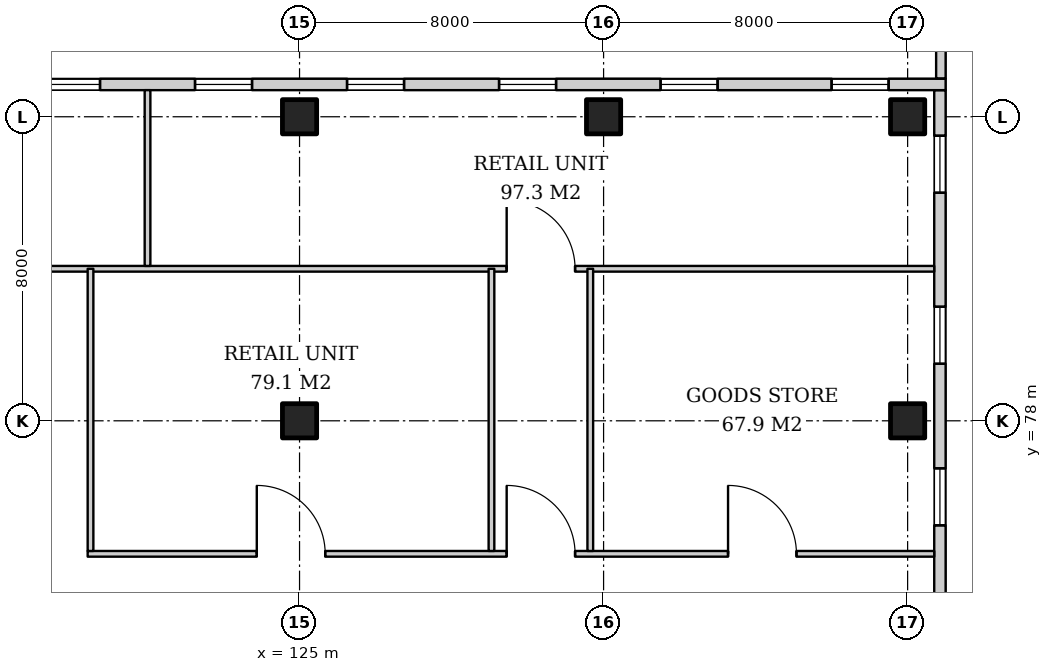
"""IFC4 building model, lengths in metres.
Left out: names, types, materials, properties, quantities, classifications, styles, units other than length and angle.
Written with IfcOpenShell. Run it as: python <this file> out.ifc"""

import sys

from ifc_helpers import new_model, si_unit, direction, frame, frame_2d, origin, origin_2d, place, context, subcontext, project, spatial, rectangle, extrude, element, fill, save


model = new_model("IFC4")
c1 = context("Model", 3, precision=1e-05, world=origin(), true_north=direction((0.0, 1.0)))
c2 = subcontext(c1, "Body", "Model", "MODEL_VIEW")
j1 = project(units=[si_unit("LENGTHUNIT", "METRE"), si_unit("PLANEANGLEUNIT", "RADIAN")], contexts=[c1])
p1 = place(None, origin())
s1 = spatial("IfcSite", under=j1, at=p1, CompositionType="ELEMENT")
p2 = place(p1, origin())
s2 = spatial("IfcBuilding", under=s1, at=p2, CompositionType="ELEMENT")
p3 = place(p2, frame((0.0, 0.0, 6.0)))
s3 = spatial("IfcBuildingStorey", under=s2, at=p3, CompositionType="ELEMENT", Elevation=6.0)
for number, where, z_axis, x_axis in (
    (1, (125.0, 78.0, 0.0), (0.0, 0.0, 1.0), (1.0, 0.0, 0.0)),
    (2, (125.0, 86.0, 0.0), (0.0, 0.0, 1.0), (1.0, 0.0, 0.0)),
    (3, (133.0, 86.0, 0.0), (0.0, 0.0, 1.0), (1.0, 0.0, 0.0)),
    (4, (141.0, 78.0, 0.0), (0.0, 0.0, 1.0), (1.0, 0.0, 0.0)),
    (5, (141.0, 86.0, 0.0), (0.0, 0.0, 1.0), (1.0, 0.0, 0.0)),
):
    element("IfcColumn", number, at=place(p3, frame(where, z_axis=z_axis, x_axis=x_axis)), inside=s3, PredefinedType="COLUMN", context=c2, shape_type="SweptSolid", body=[
        extrude(rectangle(XDim=0.9, YDim=0.9, at=origin_2d()), origin(), (0.0, 0.0, 1.0), 5.0),
    ])
p4 = place(p3, frame((141.85, 13.3, 0.0), z_axis=(0.0, 0.0, 1.0), x_axis=(0.0, 1.0, 0.0)))
e6 = element("IfcWall", 6, at=p4, inside=s3, PredefinedType="SOLIDWALL", context=c2, shape_type="SweptSolid", body=[
    extrude(rectangle(XDim=73.4, YDim=0.3, at=frame_2d((36.7, 0.0))), origin(), (0.0, 0.0, 1.0), 4.7),
])
p5 = place(p4, frame((1.2, 0.0, 0.9)))
e7 = element("IfcOpeningElement", 7, at=p5, cuts=e6, PredefinedType="OPENING", context=c2, shape_type="SweptSolid", body=[
    extrude(rectangle(XDim=1.5, YDim=3.2, at=frame_2d((0.75, 1.6))), frame((0.0, 0.16, 0.0), z_axis=(0.0, -1.0, 0.0), x_axis=(1.0, 0.0, 0.0)), (0.0, 0.0, 1.0), 0.32),
])
p6 = place(p4, frame((5.7, 0.0, 0.9)))
e8 = element("IfcOpeningElement", 8, at=p6, cuts=e6, PredefinedType="OPENING", context=c2, shape_type="SweptSolid", body=[
    extrude(rectangle(XDim=1.5, YDim=3.2, at=frame_2d((0.75, 1.6))), frame((0.0, 0.16, 0.0), z_axis=(0.0, -1.0, 0.0), x_axis=(1.0, 0.0, 0.0)), (0.0, 0.0, 1.0), 0.32),
])
p7 = place(p4, frame((9.95, 0.0, 0.9)))
e9 = element("IfcOpeningElement", 9, at=p7, cuts=e6, PredefinedType="OPENING", context=c2, shape_type="SweptSolid", body=[
    extrude(rectangle(XDim=1.5, YDim=3.2, at=frame_2d((0.75, 1.6))), frame((0.0, 0.16, 0.0), z_axis=(0.0, -1.0, 0.0), x_axis=(1.0, 0.0, 0.0)), (0.0, 0.0, 1.0), 0.32),
])
p8 = place(p4, frame((13.95, 0.0, 0.9)))
e10 = element("IfcOpeningElement", 10, at=p8, cuts=e6, PredefinedType="OPENING", context=c2, shape_type="SweptSolid", body=[
    extrude(rectangle(XDim=1.5, YDim=3.2, at=frame_2d((0.75, 1.6))), frame((0.0, 0.16, 0.0), z_axis=(0.0, -1.0, 0.0), x_axis=(1.0, 0.0, 0.0)), (0.0, 0.0, 1.0), 0.32),
])
p9 = place(p4, frame((17.95, 0.0, 0.9)))
e11 = element("IfcOpeningElement", 11, at=p9, cuts=e6, PredefinedType="OPENING", context=c2, shape_type="SweptSolid", body=[
    extrude(rectangle(XDim=1.5, YDim=3.2, at=frame_2d((0.75, 1.6))), frame((0.0, 0.16, 0.0), z_axis=(0.0, -1.0, 0.0), x_axis=(1.0, 0.0, 0.0)), (0.0, 0.0, 1.0), 0.32),
])
p10 = place(p4, frame((21.95, 0.0, 0.9)))
e12 = element("IfcOpeningElement", 12, at=p10, cuts=e6, PredefinedType="OPENING", context=c2, shape_type="SweptSolid", body=[
    extrude(rectangle(XDim=1.5, YDim=3.2, at=frame_2d((0.75, 1.6))), frame((0.0, 0.16, 0.0), z_axis=(0.0, -1.0, 0.0), x_axis=(1.0, 0.0, 0.0)), (0.0, 0.0, 1.0), 0.32),
])
p11 = place(p4, frame((25.95, 0.0, 0.9)))
e13 = element("IfcOpeningElement", 13, at=p11, cuts=e6, PredefinedType="OPENING", context=c2, shape_type="SweptSolid", body=[
    extrude(rectangle(XDim=1.5, YDim=3.2, at=frame_2d((0.75, 1.6))), frame((0.0, 0.16, 0.0), z_axis=(0.0, -1.0, 0.0), x_axis=(1.0, 0.0, 0.0)), (0.0, 0.0, 1.0), 0.32),
])
p12 = place(p4, frame((29.95, 0.0, 0.9)))
e14 = element("IfcOpeningElement", 14, at=p12, cuts=e6, PredefinedType="OPENING", context=c2, shape_type="SweptSolid", body=[
    extrude(rectangle(XDim=1.5, YDim=3.2, at=frame_2d((0.75, 1.6))), frame((0.0, 0.16, 0.0), z_axis=(0.0, -1.0, 0.0), x_axis=(1.0, 0.0, 0.0)), (0.0, 0.0, 1.0), 0.32),
])
p13 = place(p4, frame((33.95, 0.0, 0.9)))
e15 = element("IfcOpeningElement", 15, at=p13, cuts=e6, PredefinedType="OPENING", context=c2, shape_type="SweptSolid", body=[
    extrude(rectangle(XDim=1.5, YDim=3.2, at=frame_2d((0.75, 1.6))), frame((0.0, 0.16, 0.0), z_axis=(0.0, -1.0, 0.0), x_axis=(1.0, 0.0, 0.0)), (0.0, 0.0, 1.0), 0.32),
])
p14 = place(p4, frame((37.95, 0.0, 0.9)))
e16 = element("IfcOpeningElement", 16, at=p14, cuts=e6, PredefinedType="OPENING", context=c2, shape_type="SweptSolid", body=[
    extrude(rectangle(XDim=1.5, YDim=3.2, at=frame_2d((0.75, 1.6))), frame((0.0, 0.16, 0.0), z_axis=(0.0, -1.0, 0.0), x_axis=(1.0, 0.0, 0.0)), (0.0, 0.0, 1.0), 0.32),
])
p15 = place(p4, frame((41.95, 0.0, 0.9)))
e17 = element("IfcOpeningElement", 17, at=p15, cuts=e6, PredefinedType="OPENING", context=c2, shape_type="SweptSolid", body=[
    extrude(rectangle(XDim=1.5, YDim=3.2, at=frame_2d((0.75, 1.6))), frame((0.0, 0.16, 0.0), z_axis=(0.0, -1.0, 0.0), x_axis=(1.0, 0.0, 0.0)), (0.0, 0.0, 1.0), 0.32),
])
p16 = place(p4, frame((45.95, 0.0, 0.9)))
e18 = element("IfcOpeningElement", 18, at=p16, cuts=e6, PredefinedType="OPENING", context=c2, shape_type="SweptSolid", body=[
    extrude(rectangle(XDim=1.5, YDim=3.2, at=frame_2d((0.75, 1.6))), frame((0.0, 0.16, 0.0), z_axis=(0.0, -1.0, 0.0), x_axis=(1.0, 0.0, 0.0)), (0.0, 0.0, 1.0), 0.32),
])
p17 = place(p4, frame((49.95, 0.0, 0.9)))
e19 = element("IfcOpeningElement", 19, at=p17, cuts=e6, PredefinedType="OPENING", context=c2, shape_type="SweptSolid", body=[
    extrude(rectangle(XDim=1.5, YDim=3.2, at=frame_2d((0.75, 1.6))), frame((0.0, 0.16, 0.0), z_axis=(0.0, -1.0, 0.0), x_axis=(1.0, 0.0, 0.0)), (0.0, 0.0, 1.0), 0.32),
])
p18 = place(p4, frame((53.95, 0.0, 0.9)))
e20 = element("IfcOpeningElement", 20, at=p18, cuts=e6, PredefinedType="OPENING", context=c2, shape_type="SweptSolid", body=[
    extrude(rectangle(XDim=1.5, YDim=3.2, at=frame_2d((0.75, 1.6))), frame((0.0, 0.16, 0.0), z_axis=(0.0, -1.0, 0.0), x_axis=(1.0, 0.0, 0.0)), (0.0, 0.0, 1.0), 0.32),
])
p19 = place(p4, frame((57.95, 0.0, 0.9)))
e21 = element("IfcOpeningElement", 21, at=p19, cuts=e6, PredefinedType="OPENING", context=c2, shape_type="SweptSolid", body=[
    extrude(rectangle(XDim=1.5, YDim=3.2, at=frame_2d((0.75, 1.6))), frame((0.0, 0.16, 0.0), z_axis=(0.0, -1.0, 0.0), x_axis=(1.0, 0.0, 0.0)), (0.0, 0.0, 1.0), 0.32),
])
p20 = place(p4, frame((61.95, 0.0, 0.9)))
e22 = element("IfcOpeningElement", 22, at=p20, cuts=e6, PredefinedType="OPENING", context=c2, shape_type="SweptSolid", body=[
    extrude(rectangle(XDim=1.5, YDim=3.2, at=frame_2d((0.75, 1.6))), frame((0.0, 0.16, 0.0), z_axis=(0.0, -1.0, 0.0), x_axis=(1.0, 0.0, 0.0)), (0.0, 0.0, 1.0), 0.32),
])
p21 = place(p4, frame((66.2, 0.0, 0.9)))
e23 = element("IfcOpeningElement", 23, at=p21, cuts=e6, PredefinedType="OPENING", context=c2, shape_type="SweptSolid", body=[
    extrude(rectangle(XDim=1.5, YDim=3.2, at=frame_2d((0.75, 1.6))), frame((0.0, 0.16, 0.0), z_axis=(0.0, -1.0, 0.0), x_axis=(1.0, 0.0, 0.0)), (0.0, 0.0, 1.0), 0.32),
])
p22 = place(p4, frame((70.7, 0.0, 0.9)))
e24 = element("IfcOpeningElement", 24, at=p22, cuts=e6, PredefinedType="OPENING", context=c2, shape_type="SweptSolid", body=[
    extrude(rectangle(XDim=1.5, YDim=3.2, at=frame_2d((0.75, 1.6))), frame((0.0, 0.16, 0.0), z_axis=(0.0, -1.0, 0.0), x_axis=(1.0, 0.0, 0.0)), (0.0, 0.0, 1.0), 0.32),
])
p23 = place(p3, frame((142.0, 86.85, 0.0), z_axis=(0.0, 0.0, 1.0), x_axis=(-1.0, 0.0, 0.0)))
e25 = element("IfcWall", 25, at=p23, inside=s3, PredefinedType="SOLIDWALL", context=c2, shape_type="SweptSolid", body=[
    extrude(rectangle(XDim=50.0, YDim=0.3, at=frame_2d((25.0, 0.0))), origin(), (0.0, 0.0, 1.0), 4.7),
])
p24 = place(p23, frame((1.5, 0.0, 0.9)))
e26 = element("IfcOpeningElement", 26, at=p24, cuts=e25, PredefinedType="OPENING", context=c2, shape_type="SweptSolid", body=[
    extrude(rectangle(XDim=1.5, YDim=3.2, at=frame_2d((0.75, 1.6))), frame((0.0, 0.16, 0.0), z_axis=(0.0, -1.0, 0.0), x_axis=(1.0, 0.0, 0.0)), (0.0, 0.0, 1.0), 0.32),
])
p25 = place(p23, frame((6.0, 0.0, 0.9)))
e27 = element("IfcOpeningElement", 27, at=p25, cuts=e25, PredefinedType="OPENING", context=c2, shape_type="SweptSolid", body=[
    extrude(rectangle(XDim=1.5, YDim=3.2, at=frame_2d((0.75, 1.6))), frame((0.0, 0.16, 0.0), z_axis=(0.0, -1.0, 0.0), x_axis=(1.0, 0.0, 0.0)), (0.0, 0.0, 1.0), 0.32),
])
p26 = place(p23, frame((10.25, 0.0, 0.9)))
e28 = element("IfcOpeningElement", 28, at=p26, cuts=e25, PredefinedType="OPENING", context=c2, shape_type="SweptSolid", body=[
    extrude(rectangle(XDim=1.5, YDim=3.2, at=frame_2d((0.75, 1.6))), frame((0.0, 0.16, 0.0), z_axis=(0.0, -1.0, 0.0), x_axis=(1.0, 0.0, 0.0)), (0.0, 0.0, 1.0), 0.32),
])
p27 = place(p23, frame((14.25, 0.0, 0.9)))
e29 = element("IfcOpeningElement", 29, at=p27, cuts=e25, PredefinedType="OPENING", context=c2, shape_type="SweptSolid", body=[
    extrude(rectangle(XDim=1.5, YDim=3.2, at=frame_2d((0.75, 1.6))), frame((0.0, 0.16, 0.0), z_axis=(0.0, -1.0, 0.0), x_axis=(1.0, 0.0, 0.0)), (0.0, 0.0, 1.0), 0.32),
])
p28 = place(p23, frame((18.25, 0.0, 0.9)))
e30 = element("IfcOpeningElement", 30, at=p28, cuts=e25, PredefinedType="OPENING", context=c2, shape_type="SweptSolid", body=[
    extrude(rectangle(XDim=1.5, YDim=3.2, at=frame_2d((0.75, 1.6))), frame((0.0, 0.16, 0.0), z_axis=(0.0, -1.0, 0.0), x_axis=(1.0, 0.0, 0.0)), (0.0, 0.0, 1.0), 0.32),
])
p29 = place(p23, frame((22.25, 0.0, 0.9)))
e31 = element("IfcOpeningElement", 31, at=p29, cuts=e25, PredefinedType="OPENING", context=c2, shape_type="SweptSolid", body=[
    extrude(rectangle(XDim=1.5, YDim=3.2, at=frame_2d((0.75, 1.6))), frame((0.0, 0.16, 0.0), z_axis=(0.0, -1.0, 0.0), x_axis=(1.0, 0.0, 0.0)), (0.0, 0.0, 1.0), 0.32),
])
p30 = place(p23, frame((26.1, 0.0, 0.0)))
e32 = element("IfcOpeningElement", 32, at=p30, cuts=e25, PredefinedType="OPENING", context=c2, shape_type="SweptSolid", body=[
    extrude(rectangle(XDim=1.8, YDim=2.4, at=frame_2d((0.9, 1.2))), frame((0.0, 0.16, 0.0), z_axis=(0.0, -1.0, 0.0), x_axis=(1.0, 0.0, 0.0)), (0.0, 0.0, 1.0), 0.32),
])
p31 = place(p23, frame((30.25, 0.0, 0.9)))
e33 = element("IfcOpeningElement", 33, at=p31, cuts=e25, PredefinedType="OPENING", context=c2, shape_type="SweptSolid", body=[
    extrude(rectangle(XDim=1.5, YDim=3.2, at=frame_2d((0.75, 1.6))), frame((0.0, 0.16, 0.0), z_axis=(0.0, -1.0, 0.0), x_axis=(1.0, 0.0, 0.0)), (0.0, 0.0, 1.0), 0.32),
])
p32 = place(p23, frame((34.25, 0.0, 0.9)))
e34 = element("IfcOpeningElement", 34, at=p32, cuts=e25, PredefinedType="OPENING", context=c2, shape_type="SweptSolid", body=[
    extrude(rectangle(XDim=1.5, YDim=3.2, at=frame_2d((0.75, 1.6))), frame((0.0, 0.16, 0.0), z_axis=(0.0, -1.0, 0.0), x_axis=(1.0, 0.0, 0.0)), (0.0, 0.0, 1.0), 0.32),
])
p33 = place(p23, frame((38.25, 0.0, 0.9)))
e35 = element("IfcOpeningElement", 35, at=p33, cuts=e25, PredefinedType="OPENING", context=c2, shape_type="SweptSolid", body=[
    extrude(rectangle(XDim=1.5, YDim=3.2, at=frame_2d((0.75, 1.6))), frame((0.0, 0.16, 0.0), z_axis=(0.0, -1.0, 0.0), x_axis=(1.0, 0.0, 0.0)), (0.0, 0.0, 1.0), 0.32),
])
p34 = place(p23, frame((42.5, 0.0, 0.9)))
e36 = element("IfcOpeningElement", 36, at=p34, cuts=e25, PredefinedType="OPENING", context=c2, shape_type="SweptSolid", body=[
    extrude(rectangle(XDim=1.5, YDim=3.2, at=frame_2d((0.75, 1.6))), frame((0.0, 0.16, 0.0), z_axis=(0.0, -1.0, 0.0), x_axis=(1.0, 0.0, 0.0)), (0.0, 0.0, 1.0), 0.32),
])
p35 = place(p23, frame((47.0, 0.0, 0.9)))
e37 = element("IfcOpeningElement", 37, at=p35, cuts=e25, PredefinedType="OPENING", context=c2, shape_type="SweptSolid", body=[
    extrude(rectangle(XDim=1.5, YDim=3.2, at=frame_2d((0.75, 1.6))), frame((0.0, 0.16, 0.0), z_axis=(0.0, -1.0, 0.0), x_axis=(1.0, 0.0, 0.0)), (0.0, 0.0, 1.0), 0.32),
])
p36 = place(p3, frame((141.875, 87.01, 0.0), z_axis=(0.0, 0.0, 1.0), x_axis=(0.0, 1.0, 0.0)))
e38 = element("IfcWall", 38, at=p36, inside=s3, PredefinedType="PARAPET", context=c2, shape_type="SweptSolid", body=[
    extrude(rectangle(XDim=7.74, YDim=0.25, at=frame_2d((3.87, 0.0))), origin(), (0.0, 0.0, 1.0), 1.1),
])
p37 = place(p3, frame((92.3, 82.0, 0.0), z_axis=(0.0, 0.0, 1.0), x_axis=(1.0, 0.0, 0.0)))
e39 = element("IfcWall", 39, at=p37, inside=s3, PredefinedType="PARTITIONING", context=c2, shape_type="SweptSolid", body=[
    extrude(rectangle(XDim=49.4, YDim=0.15, at=frame_2d((24.7, 0.0))), origin(), (0.0, 0.0, 1.0), 3.2),
])
p38 = place(p37, frame((5.45, 0.0, 0.0)))
e40 = element("IfcOpeningElement", 40, at=p38, cuts=e39, PredefinedType="OPENING", context=c2, shape_type="SweptSolid", body=[
    extrude(rectangle(XDim=1.8, YDim=2.4, at=frame_2d((0.9, 1.2))), frame((0.0, 0.085, 0.0), z_axis=(0.0, -1.0, 0.0), x_axis=(1.0, 0.0, 0.0)), (0.0, 0.0, 1.0), 0.17),
])
p39 = place(p37, frame((19.8, 0.0, 0.0)))
e41 = element("IfcOpeningElement", 41, at=p39, cuts=e39, PredefinedType="OPENING", context=c2, shape_type="SweptSolid", body=[
    extrude(rectangle(XDim=1.8, YDim=2.4, at=frame_2d((0.9, 1.2))), frame((0.0, 0.085, 0.0), z_axis=(0.0, -1.0, 0.0), x_axis=(1.0, 0.0, 0.0)), (0.0, 0.0, 1.0), 0.17),
])
p40 = place(p37, frame((38.15, 0.0, 0.0)))
e42 = element("IfcOpeningElement", 42, at=p40, cuts=e39, PredefinedType="OPENING", context=c2, shape_type="SweptSolid", body=[
    extrude(rectangle(XDim=1.8, YDim=2.4, at=frame_2d((0.9, 1.2))), frame((0.0, 0.085, 0.0), z_axis=(0.0, -1.0, 0.0), x_axis=(1.0, 0.0, 0.0)), (0.0, 0.0, 1.0), 0.17),
])
p41 = place(p3, frame((121.0, 82.075, 0.0), z_axis=(0.0, 0.0, 1.0), x_axis=(0.0, 1.0, 0.0)))
e43 = element("IfcWall", 43, at=p41, inside=s3, PredefinedType="PARTITIONING", context=c2, shape_type="SweptSolid", body=[
    extrude(rectangle(XDim=4.625, YDim=0.15, at=frame_2d((2.312, 0.0))), origin(), (0.0, 0.0, 1.0), 3.2),
])
p42 = place(p3, frame((119.425, 74.5, 0.0), z_axis=(0.0, 0.0, 1.0), x_axis=(1.0, 0.0, 0.0)))
e44 = element("IfcWall", 44, at=p42, inside=s3, PredefinedType="PARTITIONING", context=c2, shape_type="SweptSolid", body=[
    extrude(rectangle(XDim=22.275, YDim=0.15, at=frame_2d((11.137, 0.0))), origin(), (0.0, 0.0, 1.0), 4.7),
])
p43 = place(p42, frame((4.45, 0.0, 0.0)))
e45 = element("IfcOpeningElement", 45, at=p43, cuts=e44, PredefinedType="OPENING", context=c2, shape_type="SweptSolid", body=[
    extrude(rectangle(XDim=1.8, YDim=2.4, at=frame_2d((0.9, 1.2))), frame((0.0, 0.085, 0.0), z_axis=(0.0, -1.0, 0.0), x_axis=(1.0, 0.0, 0.0)), (0.0, 0.0, 1.0), 0.17),
])
p44 = place(p42, frame((11.025, 0.0, 0.0)))
e46 = element("IfcOpeningElement", 46, at=p44, cuts=e44, PredefinedType="OPENING", context=c2, shape_type="SweptSolid", body=[
    extrude(rectangle(XDim=1.8, YDim=2.4, at=frame_2d((0.9, 1.2))), frame((0.0, 0.085, 0.0), z_axis=(0.0, -1.0, 0.0), x_axis=(1.0, 0.0, 0.0)), (0.0, 0.0, 1.0), 0.17),
])
p45 = place(p42, frame((16.85, 0.0, 0.0)))
e47 = element("IfcOpeningElement", 47, at=p45, cuts=e44, PredefinedType="OPENING", context=c2, shape_type="SweptSolid", body=[
    extrude(rectangle(XDim=1.8, YDim=2.4, at=frame_2d((0.9, 1.2))), frame((0.0, 0.085, 0.0), z_axis=(0.0, -1.0, 0.0), x_axis=(1.0, 0.0, 0.0)), (0.0, 0.0, 1.0), 0.17),
])
for number, where, z_axis, x_axis in (
    (48, (119.5, 74.575, 0.0), (0.0, 0.0, 1.0), (0.0, 1.0, 0.0)),
    (49, (130.05, 74.575, 0.0), (0.0, 0.0, 1.0), (0.0, 1.0, 0.0)),
    (50, (132.65, 74.575, 0.0), (0.0, 0.0, 1.0), (0.0, 1.0, 0.0)),
):
    element("IfcWall", number, at=place(p3, frame(where, z_axis=z_axis, x_axis=x_axis)), inside=s3, PredefinedType="PARTITIONING", context=c2, shape_type="SweptSolid", body=[
        extrude(rectangle(XDim=7.425, YDim=0.15, at=frame_2d((3.712, 0.0))), origin(), (0.0, 0.0, 1.0), 4.7),
    ])
p46 = place(p20, origin())
e51 = element("IfcWindow", 51, at=p46, inside=s3, PartitioningType="SINGLE_PANEL", PredefinedType="WINDOW", context=c2, shape_type="SweptSolid", body=[
    extrude(rectangle(XDim=1.5, YDim=3.2, at=frame_2d((0.75, 1.6))), frame((0.0, 0.03, 0.0), z_axis=(0.0, -1.0, 0.0), x_axis=(1.0, 0.0, 0.0)), (0.0, 0.0, 1.0), 0.06),
])
fill(e22, e51)
p47 = place(p21, origin())
e52 = element("IfcWindow", 52, at=p47, inside=s3, PartitioningType="SINGLE_PANEL", PredefinedType="WINDOW", context=c2, shape_type="SweptSolid", body=[
    extrude(rectangle(XDim=1.5, YDim=3.2, at=frame_2d((0.75, 1.6))), frame((0.0, 0.03, 0.0), z_axis=(0.0, -1.0, 0.0), x_axis=(1.0, 0.0, 0.0)), (0.0, 0.0, 1.0), 0.06),
])
fill(e23, e52)
p48 = place(p22, origin())
e53 = element("IfcWindow", 53, at=p48, inside=s3, PartitioningType="SINGLE_PANEL", PredefinedType="WINDOW", context=c2, shape_type="SweptSolid", body=[
    extrude(rectangle(XDim=1.5, YDim=3.2, at=frame_2d((0.75, 1.6))), frame((0.0, 0.03, 0.0), z_axis=(0.0, -1.0, 0.0), x_axis=(1.0, 0.0, 0.0)), (0.0, 0.0, 1.0), 0.06),
])
fill(e24, e53)
p49 = place(p24, origin())
e54 = element("IfcWindow", 54, at=p49, inside=s3, PartitioningType="SINGLE_PANEL", PredefinedType="WINDOW", context=c2, shape_type="SweptSolid", body=[
    extrude(rectangle(XDim=1.5, YDim=3.2, at=frame_2d((0.75, 1.6))), frame((0.0, 0.03, 0.0), z_axis=(0.0, -1.0, 0.0), x_axis=(1.0, 0.0, 0.0)), (0.0, 0.0, 1.0), 0.06),
])
fill(e26, e54)
p50 = place(p25, origin())
e55 = element("IfcWindow", 55, at=p50, inside=s3, PartitioningType="SINGLE_PANEL", PredefinedType="WINDOW", context=c2, shape_type="SweptSolid", body=[
    extrude(rectangle(XDim=1.5, YDim=3.2, at=frame_2d((0.75, 1.6))), frame((0.0, 0.03, 0.0), z_axis=(0.0, -1.0, 0.0), x_axis=(1.0, 0.0, 0.0)), (0.0, 0.0, 1.0), 0.06),
])
fill(e27, e55)
p51 = place(p26, origin())
e56 = element("IfcWindow", 56, at=p51, inside=s3, PartitioningType="SINGLE_PANEL", PredefinedType="WINDOW", context=c2, shape_type="SweptSolid", body=[
    extrude(rectangle(XDim=1.5, YDim=3.2, at=frame_2d((0.75, 1.6))), frame((0.0, 0.03, 0.0), z_axis=(0.0, -1.0, 0.0), x_axis=(1.0, 0.0, 0.0)), (0.0, 0.0, 1.0), 0.06),
])
fill(e28, e56)
p52 = place(p27, origin())
e57 = element("IfcWindow", 57, at=p52, inside=s3, PartitioningType="SINGLE_PANEL", PredefinedType="WINDOW", context=c2, shape_type="SweptSolid", body=[
    extrude(rectangle(XDim=1.5, YDim=3.2, at=frame_2d((0.75, 1.6))), frame((0.0, 0.03, 0.0), z_axis=(0.0, -1.0, 0.0), x_axis=(1.0, 0.0, 0.0)), (0.0, 0.0, 1.0), 0.06),
])
fill(e29, e57)
p53 = place(p28, origin())
e58 = element("IfcWindow", 58, at=p53, inside=s3, PartitioningType="SINGLE_PANEL", PredefinedType="WINDOW", context=c2, shape_type="SweptSolid", body=[
    extrude(rectangle(XDim=1.5, YDim=3.2, at=frame_2d((0.75, 1.6))), frame((0.0, 0.03, 0.0), z_axis=(0.0, -1.0, 0.0), x_axis=(1.0, 0.0, 0.0)), (0.0, 0.0, 1.0), 0.06),
])
fill(e30, e58)
p54 = place(p29, origin())
e59 = element("IfcWindow", 59, at=p54, inside=s3, PartitioningType="SINGLE_PANEL", PredefinedType="WINDOW", context=c2, shape_type="SweptSolid", body=[
    extrude(rectangle(XDim=1.5, YDim=3.2, at=frame_2d((0.75, 1.6))), frame((0.0, 0.03, 0.0), z_axis=(0.0, -1.0, 0.0), x_axis=(1.0, 0.0, 0.0)), (0.0, 0.0, 1.0), 0.06),
])
fill(e31, e59)
p55 = place(p40, origin())
e60 = element("IfcDoor", 60, at=p55, inside=s3, OperationType="DOUBLE_DOOR_SINGLE_SWING", PredefinedType="DOOR", context=c2, shape_type="SweptSolid", body=[
    extrude(rectangle(XDim=1.8, YDim=2.4, at=frame_2d((0.9, 1.2))), frame((0.0, 0.025, 0.0), z_axis=(0.0, -1.0, 0.0), x_axis=(1.0, 0.0, 0.0)), (0.0, 0.0, 1.0), 0.05),
])
fill(e42, e60)
p56 = place(p43, origin())
e61 = element("IfcDoor", 61, at=p56, inside=s3, OperationType="DOUBLE_DOOR_SINGLE_SWING", PredefinedType="DOOR", context=c2, shape_type="SweptSolid", body=[
    extrude(rectangle(XDim=1.8, YDim=2.4, at=frame_2d((0.9, 1.2))), frame((0.0, 0.025, 0.0), z_axis=(0.0, -1.0, 0.0), x_axis=(1.0, 0.0, 0.0)), (0.0, 0.0, 1.0), 0.05),
])
fill(e45, e61)
p57 = place(p44, origin())
e62 = element("IfcDoor", 62, at=p57, inside=s3, OperationType="DOUBLE_DOOR_SINGLE_SWING", PredefinedType="DOOR", context=c2, shape_type="SweptSolid", body=[
    extrude(rectangle(XDim=1.8, YDim=2.4, at=frame_2d((0.9, 1.2))), frame((0.0, 0.025, 0.0), z_axis=(0.0, -1.0, 0.0), x_axis=(1.0, 0.0, 0.0)), (0.0, 0.0, 1.0), 0.05),
])
fill(e46, e62)
p58 = place(p45, origin())
e63 = element("IfcDoor", 63, at=p58, inside=s3, OperationType="DOUBLE_DOOR_SINGLE_SWING", PredefinedType="DOOR", context=c2, shape_type="SweptSolid", body=[
    extrude(rectangle(XDim=1.8, YDim=2.4, at=frame_2d((0.9, 1.2))), frame((0.0, 0.025, 0.0), z_axis=(0.0, -1.0, 0.0), x_axis=(1.0, 0.0, 0.0)), (0.0, 0.0, 1.0), 0.05),
])
fill(e47, e63)
save(model, sys.argv[1])
